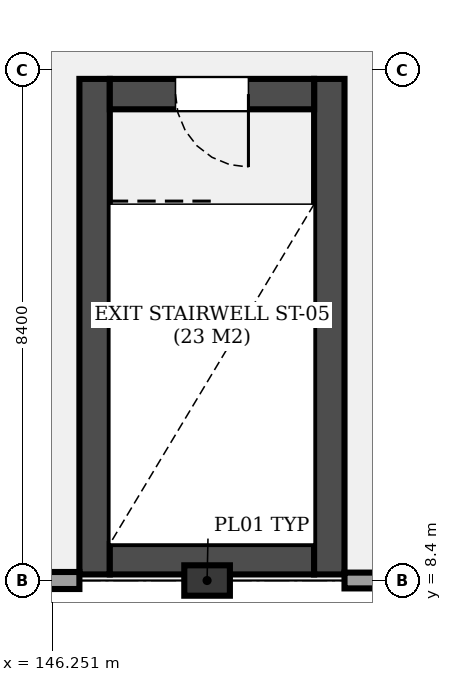
"""IFC4 building model, lengths in metres.
Left out: names, types, materials, properties, quantities, classifications, styles, units other than length and angle.
Written with IfcOpenShell. Run it as: python <this file> out.ifc"""

import sys

from ifc_helpers import new_model, si_unit, direction, frame, frame_2d, origin, origin_2d, place, context, subcontext, project, spatial, rectangle, extrude, element, fill, save


model = new_model("IFC4")
c1 = context("Model", 3, precision=1e-05, world=origin(), true_north=direction((0.0, 1.0)))
c2 = subcontext(c1, "Body", "Model", "MODEL_VIEW")
j1 = project(units=[si_unit("LENGTHUNIT", "METRE"), si_unit("PLANEANGLEUNIT", "RADIAN")], contexts=[c1])
p1 = place(None, origin())
s1 = spatial("IfcSite", under=j1, at=p1, CompositionType="ELEMENT")
p2 = place(p1, origin())
s2 = spatial("IfcBuilding", under=s1, at=p2, CompositionType="ELEMENT")
p3 = place(p2, frame((0.0, 0.0, 17.8)))
s3 = spatial("IfcBuildingStorey", under=s2, at=p3, CompositionType="ELEMENT", Elevation=17.8)
p4 = place(p3, frame((148.8, 8.4, 0.0), z_axis=(0.0, 0.0, 1.0), x_axis=(1.0, 0.0, 0.0)))
e1 = element("IfcColumn", 1, at=p4, inside=s3, PredefinedType="PILASTER", context=c2, shape_type="SweptSolid", body=[
    extrude(rectangle(XDim=0.75, YDim=0.5, at=origin_2d()), origin(), (0.0, 0.0, 1.0), 4.2),
])
p5 = place(p3, frame((146.95, 16.65, 0.0), z_axis=(0.0, 0.0, 1.0), x_axis=(0.0, -1.0, 0.0)))
e2 = element("IfcWall", 2, at=p5, inside=s3, PredefinedType="SHEAR", context=c2, shape_type="SweptSolid", body=[
    extrude(rectangle(XDim=8.15, YDim=0.5, at=frame_2d((4.075, 0.0))), origin(), (0.0, 0.0, 1.0), 4.2),
])
p6 = place(p3, frame((147.2, 8.75, 0.0), z_axis=(0.0, 0.0, 1.0), x_axis=(1.0, 0.0, 0.0)))
e3 = element("IfcWall", 3, at=p6, inside=s3, PredefinedType="SHEAR", context=c2, shape_type="SweptSolid", body=[
    extrude(rectangle(XDim=3.36, YDim=0.5, at=frame_2d((1.68, 0.0))), origin(), (0.0, 0.0, 1.0), 4.2),
])
p7 = place(p3, frame((150.81, 8.5, 0.0), z_axis=(0.0, 0.0, 1.0), x_axis=(0.0, 1.0, 0.0)))
e4 = element("IfcWall", 4, at=p7, inside=s3, PredefinedType="SHEAR", context=c2, shape_type="SweptSolid", body=[
    extrude(rectangle(XDim=8.15, YDim=0.5, at=frame_2d((4.075, 0.0))), origin(), (0.0, 0.0, 1.0), 4.2),
])
p8 = place(p3, frame((150.56, 16.4, 0.0), z_axis=(0.0, 0.0, 1.0), x_axis=(-1.0, 0.0, 0.0)))
e5 = element("IfcWall", 5, at=p8, inside=s3, PredefinedType="SHEAR", context=c2, shape_type="SweptSolid", body=[
    extrude(rectangle(XDim=3.36, YDim=0.5, at=frame_2d((1.68, 0.0))), origin(), (0.0, 0.0, 1.0), 4.2),
])
p9 = place(p8, frame((1.08, 0.0, 0.0)))
e6 = element("IfcOpeningElement", 6, at=p9, cuts=e5, PredefinedType="OPENING", context=c2, shape_type="SweptSolid", body=[
    extrude(rectangle(XDim=1.2, YDim=2.2, at=frame_2d((0.6, 1.1))), frame((0.0, 0.26, 0.0), z_axis=(0.0, -1.0, 0.0), x_axis=(1.0, 0.0, 0.0)), (0.0, 0.0, 1.0), 0.52),
])
p10 = place(p3, frame((153.6, 8.4, 0.0), z_axis=(0.0, 0.0, 1.0), x_axis=(-1.0, 0.0, 0.0)))
e7 = element("IfcWall", 7, at=p10, inside=s3, PredefinedType="SOLIDWALL", context=c2, shape_type="SweptSolid", body=[
    extrude(rectangle(XDim=2.54, YDim=0.26, at=frame_2d((1.27, 0.0))), origin(), (0.0, 0.0, 1.0), 3.39),
])
p11 = place(p3, frame((146.7, 8.4, 0.0), z_axis=(0.0, 0.0, 1.0), x_axis=(-1.0, 0.0, 0.0)))
e8 = element("IfcWall", 8, at=p11, inside=s3, PredefinedType="SOLIDWALL", context=c2, shape_type="SweptSolid", body=[
    extrude(rectangle(XDim=2.7, YDim=0.28, at=frame_2d((1.35, 0.0))), origin(), (0.0, 0.0, 1.0), 3.39),
])
p12 = place(p9, origin())
e9 = element("IfcDoor", 9, at=p12, inside=s3, OperationType="SINGLE_SWING_LEFT", PredefinedType="DOOR", context=c2, shape_type="SweptSolid", body=[
    extrude(rectangle(XDim=1.2, YDim=2.2, at=frame_2d((0.6, 1.1))), frame((0.0, 0.025, 0.0), z_axis=(0.0, -1.0, 0.0), x_axis=(1.0, 0.0, 0.0)), (0.0, 0.0, 1.0), 0.05),
])
fill(e6, e9)
save(model, sys.argv[1])
